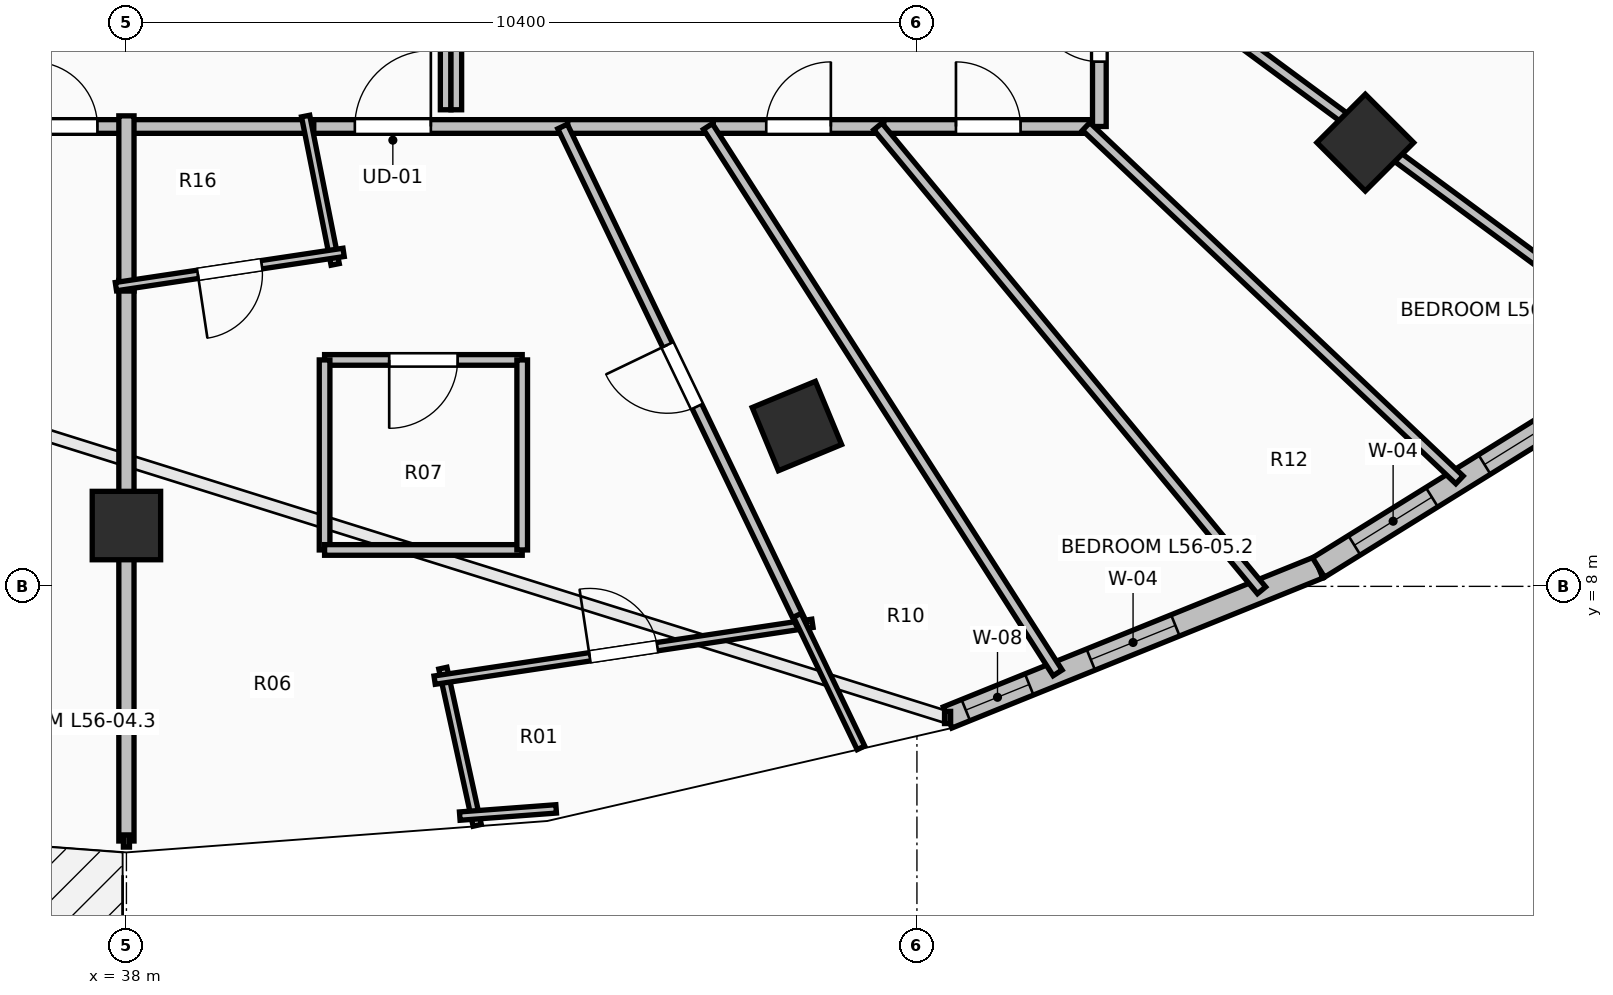
"""IFC4 building model, lengths in metres.
Left out: names, types, materials, properties, quantities, classifications, styles, units other than length and angle.
Written with IfcOpenShell. Run it as: python <this file> out.ifc"""

import sys

from ifc_helpers import new_model, si_unit, direction, frame, frame_2d, origin, origin_2d, place, context, subcontext, project, spatial, rectangle, extrude, element, fill, save


model = new_model("IFC4")
c1 = context("Model", 3, precision=1e-05, world=origin(), true_north=direction((0.0, 1.0)))
c2 = subcontext(c1, "Body", "Model", "MODEL_VIEW")
j1 = project(units=[si_unit("LENGTHUNIT", "METRE"), si_unit("PLANEANGLEUNIT", "RADIAN")], contexts=[c1])
p1 = place(None, origin())
s1 = spatial("IfcSite", under=j1, at=p1, CompositionType="ELEMENT")
p2 = place(p1, origin())
s2 = spatial("IfcBuilding", under=s1, at=p2, CompositionType="ELEMENT")
p3 = place(p2, frame((0.0, 0.0, 207.2)))
s3 = spatial("IfcBuildingStorey", under=s2, at=p3, CompositionType="ELEMENT", Elevation=207.2)
for number, where, z_axis, x_axis in (
    (1, (38.0, 8.8, 0.0), (0.0, 0.0, 1.0), (0.0, -1.0, 0.0)),
    (2, (46.821, 10.109, 0.0), (0.0, 0.0, 1.0), (0.383, -0.924, 0.0)),
    (3, (54.299, 13.838, 0.0), (0.0, 0.0, 1.0), (0.707, -0.707, 0.0)),
):
    element("IfcColumn", number, at=place(p3, frame(where, z_axis=z_axis, x_axis=x_axis)), inside=s3, PredefinedType="COLUMN", context=c2, shape_type="SweptSolid", body=[
        extrude(rectangle(XDim=0.9, YDim=0.9, at=origin_2d()), origin(), (0.0, 0.0, 1.0), 3.55),
    ])
p4 = place(p3, frame((48.803, 6.275, 0.0), z_axis=(0.0, 0.0, 1.0), x_axis=(0.927111094334, 0.374786630981, 0.0)))
e4 = element("IfcWall", 4, at=p4, inside=s3, PredefinedType="STANDARD", context=c2, shape_type="SweptSolid", body=[
    extrude(rectangle(XDim=5.264, YDim=0.3, at=frame_2d((2.632, 0.0))), origin(), (0.0, 0.0, 1.0), 3.29),
])
p5 = place(p4, frame((0.258, 0.0, 0.85)))
e5 = element("IfcOpeningElement", 5, at=p5, cuts=e4, PredefinedType="OPENING", context=c2, shape_type="SweptSolid", body=[
    extrude(rectangle(XDim=0.9, YDim=1.8, at=frame_2d((0.45, 0.9))), frame((0.0, 0.165, 0.0), z_axis=(0.0, -1.0, 0.0), x_axis=(1.0, 0.0, 0.0)), (0.0, 0.0, 1.0), 0.33),
])
p6 = place(p4, frame((2.032, 0.0, 0.85)))
e6 = element("IfcOpeningElement", 6, at=p6, cuts=e4, PredefinedType="OPENING", context=c2, shape_type="SweptSolid", body=[
    extrude(rectangle(XDim=1.2, YDim=1.95, at=frame_2d((0.6, 0.975))), frame((0.0, 0.165, 0.0), z_axis=(0.0, -1.0, 0.0), x_axis=(1.0, 0.0, 0.0)), (0.0, 0.0, 1.0), 0.33),
])
p7 = place(p3, frame((53.684, 8.248, 0.0), z_axis=(0.0, 0.0, 1.0), x_axis=(0.849647657754, 0.527350791858, 0.0)))
e7 = element("IfcWall", 7, at=p7, inside=s3, PredefinedType="STANDARD", context=c2, shape_type="SweptSolid", body=[
    extrude(rectangle(XDim=5.035, YDim=0.3, at=frame_2d((2.518, 0.0))), origin(), (0.0, 0.0, 1.0), 3.29),
])
p8 = place(p7, frame((0.555, 0.0, 0.85)))
e8 = element("IfcOpeningElement", 8, at=p8, cuts=e7, PredefinedType="OPENING", context=c2, shape_type="SweptSolid", body=[
    extrude(rectangle(XDim=1.2, YDim=1.95, at=frame_2d((0.6, 0.975))), frame((0.0, 0.165, 0.0), z_axis=(0.0, -1.0, 0.0), x_axis=(1.0, 0.0, 0.0)), (0.0, 0.0, 1.0), 0.33),
])
p9 = place(p7, frame((2.569, 0.0, 0.85)))
e9 = element("IfcOpeningElement", 9, at=p9, cuts=e7, PredefinedType="OPENING", context=c2, shape_type="SweptSolid", body=[
    extrude(rectangle(XDim=1.2, YDim=1.95, at=frame_2d((0.6, 0.975))), frame((0.0, 0.165, 0.0), z_axis=(0.0, -1.0, 0.0), x_axis=(1.0, 0.0, 0.0)), (0.0, 0.0, 1.0), 0.33),
])
p10 = place(p3, frame((36.327, 14.05, 0.0), z_axis=(0.0, 0.0, 1.0), x_axis=(1.0, 0.0, 0.0)))
e10 = element("IfcWall", 10, at=p10, inside=s3, PredefinedType="PARTITIONING", context=c2, shape_type="SweptSolid", body=[
    extrude(rectangle(XDim=1.733, YDim=0.18, at=frame_2d((0.867, 0.0))), origin(), (0.0, 0.0, 1.0), 2.936),
])
p11 = place(p10, frame((0.441, 0.0, 0.0)))
e11 = element("IfcOpeningElement", 11, at=p11, cuts=e10, PredefinedType="OPENING", context=c2, shape_type="SweptSolid", body=[
    extrude(rectangle(XDim=0.85, YDim=2.1, at=frame_2d((0.425, 1.05))), frame((0.0, 0.105, 0.0), z_axis=(0.0, -1.0, 0.0), x_axis=(1.0, 0.0, 0.0)), (0.0, 0.0, 1.0), 0.21),
])
p12 = place(p3, frame((40.325, 14.05, 0.0), z_axis=(0.0, 0.0, 1.0), x_axis=(1.0, 0.0, 0.0)))
e12 = element("IfcWall", 12, at=p12, inside=s3, PredefinedType="PARTITIONING", context=c2, shape_type="SweptSolid", body=[
    extrude(rectangle(XDim=3.48, YDim=0.18, at=frame_2d((1.74, 0.0))), origin(), (0.0, 0.0, 1.0), 2.936),
])
p13 = place(p12, frame((0.68, 0.0, 0.0)))
e13 = element("IfcOpeningElement", 13, at=p13, cuts=e12, PredefinedType="OPENING", context=c2, shape_type="SweptSolid", body=[
    extrude(rectangle(XDim=1.0, YDim=2.15, at=frame_2d((0.5, 1.075))), frame((0.0, 0.105, 0.0), z_axis=(0.0, -1.0, 0.0), x_axis=(1.0, 0.0, 0.0)), (0.0, 0.0, 1.0), 0.21),
])
p14 = place(p3, frame((37.92, 14.05, 0.0), z_axis=(0.0, 0.0, 1.0), x_axis=(1.0, 0.0, 0.0)))
e14 = element("IfcWall", 14, at=p14, inside=s3, PredefinedType="PARTITIONING", context=c2, shape_type="SweptSolid", body=[
    extrude(rectangle(XDim=2.545, YDim=0.18, at=frame_2d((1.272, 0.0))), origin(), (0.0, 0.0, 1.0), 2.936),
])
p15 = place(p3, frame((43.805, 14.05, 0.0), z_axis=(0.0, 0.0, 1.0), x_axis=(1.0, 0.0, 0.0)))
e15 = element("IfcWall", 15, at=p15, inside=s3, PredefinedType="PARTITIONING", context=c2, shape_type="SweptSolid", body=[
    extrude(rectangle(XDim=1.916, YDim=0.18, at=frame_2d((0.958, 0.0))), origin(), (0.0, 0.0, 1.0), 2.482),
])
p16 = place(p3, frame((45.721, 14.05, 0.0), z_axis=(0.0, 0.0, 1.0), x_axis=(1.0, 0.0, 0.0)))
e16 = element("IfcWall", 16, at=p16, inside=s3, PredefinedType="PARTITIONING", context=c2, shape_type="SweptSolid", body=[
    extrude(rectangle(XDim=2.243, YDim=0.18, at=frame_2d((1.122, 0.0))), origin(), (0.0, 0.0, 1.0), 2.482),
])
p17 = place(p16, frame((0.697, 0.0, 0.0)))
e17 = element("IfcOpeningElement", 17, at=p17, cuts=e16, PredefinedType="OPENING", context=c2, shape_type="SweptSolid", body=[
    extrude(rectangle(XDim=0.85, YDim=2.1, at=frame_2d((0.425, 1.05))), frame((0.0, 0.105, 0.0), z_axis=(0.0, -1.0, 0.0), x_axis=(1.0, 0.0, 0.0)), (0.0, 0.0, 1.0), 0.21),
])
p18 = place(p3, frame((47.964, 14.05, 0.0), z_axis=(0.0, 0.0, 1.0), x_axis=(1.0, 0.0, 0.0)))
e18 = element("IfcWall", 18, at=p18, inside=s3, PredefinedType="PARTITIONING", context=c2, shape_type="SweptSolid", body=[
    extrude(rectangle(XDim=2.749, YDim=0.18, at=frame_2d((1.375, 0.0))), origin(), (0.0, 0.0, 1.0), 2.482),
])
p19 = place(p18, frame((0.949, 0.0, 0.0)))
e19 = element("IfcOpeningElement", 19, at=p19, cuts=e18, PredefinedType="OPENING", context=c2, shape_type="SweptSolid", body=[
    extrude(rectangle(XDim=0.85, YDim=2.1, at=frame_2d((0.425, 1.05))), frame((0.0, 0.105, 0.0), z_axis=(0.0, -1.0, 0.0), x_axis=(1.0, 0.0, 0.0)), (0.0, 0.0, 1.0), 0.21),
])
p20 = place(p3, frame((50.8, 14.05, 0.0), z_axis=(0.0, 0.0, 1.0), x_axis=(0.0, 1.0, 0.0)))
e20 = element("IfcWall", 20, at=p20, inside=s3, PredefinedType="PARTITIONING", context=c2, shape_type="SweptSolid", body=[
    extrude(rectangle(XDim=2.556, YDim=0.18, at=frame_2d((1.278, 0.0))), origin(), (0.0, 0.0, 1.0), 2.482),
])
p21 = place(p20, frame((0.853, 0.0, 0.0)))
e21 = element("IfcOpeningElement", 21, at=p21, cuts=e20, PredefinedType="OPENING", context=c2, shape_type="SweptSolid", body=[
    extrude(rectangle(XDim=0.85, YDim=2.1, at=frame_2d((0.425, 1.05))), frame((0.0, 0.105, 0.0), z_axis=(0.0, -1.0, 0.0), x_axis=(1.0, 0.0, 0.0)), (0.0, 0.0, 1.0), 0.21),
])
p22 = place(p3, frame((38.0, 4.65, 0.0), z_axis=(0.0, 0.0, 1.0), x_axis=(0.0, 1.0, 0.0)))
e22 = element("IfcWall", 22, at=p22, inside=s3, PredefinedType="PARTITIONING", context=c2, shape_type="SweptSolid", body=[
    extrude(rectangle(XDim=7.375, YDim=0.2, at=frame_2d((3.688, 0.0))), origin(), (0.0, 0.0, 1.0), 3.022),
])
p23 = place(p3, frame((38.0, 11.885, 0.0), z_axis=(0.0, 0.0, 1.0), x_axis=(0.0, 1.0, 0.0)))
e23 = element("IfcWall", 23, at=p23, inside=s3, PredefinedType="PARTITIONING", context=c2, shape_type="SweptSolid", body=[
    extrude(rectangle(XDim=2.305, YDim=0.2, at=frame_2d((1.152, 0.0))), origin(), (0.0, 0.0, 1.0), 2.936),
])
p24 = place(p3, frame((40.358, 14.187, 0.0), z_axis=(0.0, 0.0, 1.0), x_axis=(0.195313900905, -0.980740781304, 0.0)))
e24 = element("IfcWall", 24, at=p24, inside=s3, PredefinedType="PARTITIONING", context=c2, shape_type="SweptSolid", body=[
    extrude(rectangle(XDim=1.99, YDim=0.11, at=frame_2d((0.995, 0.0))), origin(), (0.0, 0.0, 1.0), 2.936),
])
p25 = place(p3, frame((40.857, 12.394, 0.0), z_axis=(0.0, 0.0, 1.0), x_axis=(-0.988873015636, -0.148762088409, 0.0)))
e25 = element("IfcWall", 25, at=p25, inside=s3, PredefinedType="PARTITIONING", context=c2, shape_type="SweptSolid", body=[
    extrude(rectangle(XDim=3.03, YDim=0.11, at=frame_2d((1.515, 0.0))), origin(), (0.0, 0.0, 1.0), 3.29),
])
p26 = place(p25, frame((1.09, 0.0, 0.0)))
e26 = element("IfcOpeningElement", 26, at=p26, cuts=e25, PredefinedType="OPENING", context=c2, shape_type="SweptSolid", body=[
    extrude(rectangle(XDim=0.85, YDim=2.1, at=frame_2d((0.425, 1.05))), frame((0.0, 0.07, 0.0), z_axis=(0.0, -1.0, 0.0), x_axis=(1.0, 0.0, 0.0)), (0.0, 0.0, 1.0), 0.14),
])
p27 = place(p3, frame((42.615, 4.856, 0.0), z_axis=(0.0, 0.0, 1.0), x_axis=(-0.213521424511, 0.976938381514, 0.0)))
e27 = element("IfcWall", 27, at=p27, inside=s3, PredefinedType="PARTITIONING", context=c2, shape_type="SweptSolid", body=[
    extrude(rectangle(XDim=2.116, YDim=0.11, at=frame_2d((1.058, 0.0))), origin(), (0.0, 0.0, 1.0), 3.29),
])
p28 = place(p3, frame((42.055, 6.766, 0.0), z_axis=(0.0, 0.0, 1.0), x_axis=(0.988872134662, 0.148767944424, 0.0)))
e28 = element("IfcWall", 28, at=p28, inside=s3, PredefinedType="PARTITIONING", context=c2, shape_type="SweptSolid", body=[
    extrude(rectangle(XDim=5.027, YDim=0.11, at=frame_2d((2.513, 0.0))), origin(), (0.0, 0.0, 1.0), 3.29),
])
p29 = place(p28, frame((2.063, 0.0, 0.0)))
e29 = element("IfcOpeningElement", 29, at=p29, cuts=e28, PredefinedType="OPENING", context=c2, shape_type="SweptSolid", body=[
    extrude(rectangle(XDim=0.9, YDim=2.1, at=frame_2d((0.45, 1.05))), frame((0.0, 0.07, 0.0), z_axis=(0.0, -1.0, 0.0), x_axis=(1.0, 0.0, 0.0)), (0.0, 0.0, 1.0), 0.14),
])
p30 = place(p3, frame((42.385, 4.978, 0.0), z_axis=(0.0, 0.0, 1.0), x_axis=(0.997207179737, 0.074684942803, 0.0)))
e30 = element("IfcWall", 30, at=p30, inside=s3, PredefinedType="PARTITIONING", context=c2, shape_type="SweptSolid", body=[
    extrude(rectangle(XDim=1.272, YDim=0.11, at=frame_2d((0.636, 0.0))), origin(), (0.0, 0.0, 1.0), 3.29),
])
p31 = place(p3, frame((43.207, 10.979, 0.0), z_axis=(0.0, 0.0, 1.0), x_axis=(-1.0, 0.0, 0.0)))
e31 = element("IfcWall", 31, at=p31, inside=s3, PredefinedType="PARTITIONING", context=c2, shape_type="SweptSolid", body=[
    extrude(rectangle(XDim=2.6, YDim=0.14, at=frame_2d((1.3, 0.0))), origin(), (0.0, 0.0, 1.0), 2.482),
])
p32 = place(p31, frame((0.85, 0.0, 0.0)))
e32 = element("IfcOpeningElement", 32, at=p32, cuts=e31, PredefinedType="OPENING", context=c2, shape_type="SweptSolid", body=[
    extrude(rectangle(XDim=0.9, YDim=2.1, at=frame_2d((0.45, 1.05))), frame((0.0, 0.085, 0.0), z_axis=(0.0, -1.0, 0.0), x_axis=(1.0, 0.0, 0.0)), (0.0, 0.0, 1.0), 0.17),
])
p33 = place(p3, frame((40.607, 10.979, 0.0), z_axis=(0.0, 0.0, 1.0), x_axis=(0.0, -1.0, 0.0)))
e33 = element("IfcWall", 33, at=p33, inside=s3, PredefinedType="PARTITIONING", context=c2, shape_type="SweptSolid", body=[
    extrude(rectangle(XDim=2.5, YDim=0.14, at=frame_2d((1.25, 0.0))), origin(), (0.0, 0.0, 1.0), 2.482),
])
p34 = place(p3, frame((40.607, 8.479, 0.0), z_axis=(0.0, 0.0, 1.0), x_axis=(1.0, 0.0, 0.0)))
e34 = element("IfcWall", 34, at=p34, inside=s3, PredefinedType="PARTITIONING", context=c2, shape_type="SweptSolid", body=[
    extrude(rectangle(XDim=2.6, YDim=0.14, at=frame_2d((1.3, 0.0))), origin(), (0.0, 0.0, 1.0), 3.29),
])
p35 = place(p3, frame((43.207, 8.479, 0.0), z_axis=(0.0, 0.0, 1.0), x_axis=(0.0, 1.0, 0.0)))
e35 = element("IfcWall", 35, at=p35, inside=s3, PredefinedType="PARTITIONING", context=c2, shape_type="SweptSolid", body=[
    extrude(rectangle(XDim=2.5, YDim=0.14, at=frame_2d((1.25, 0.0))), origin(), (0.0, 0.0, 1.0), 2.824),
])
p36 = place(p3, frame((46.887, 7.493, 0.0), z_axis=(0.0, 0.0, 1.0), x_axis=(-0.43289909466, 0.901442385204, 0.0)))
e36 = element("IfcWall", 36, at=p36, inside=s3, PredefinedType="PARTITIONING", context=c2, shape_type="SweptSolid", body=[
    extrude(rectangle(XDim=7.274, YDim=0.14, at=frame_2d((3.637, 0.0))), origin(), (0.0, 0.0, 1.0), 2.482),
])
p37 = place(p36, frame((3.187, 0.0, 0.0)))
e37 = element("IfcOpeningElement", 37, at=p37, cuts=e36, PredefinedType="OPENING", context=c2, shape_type="SweptSolid", body=[
    extrude(rectangle(XDim=0.9, YDim=2.1, at=frame_2d((0.45, 1.05))), frame((0.0, 0.085, 0.0), z_axis=(0.0, -1.0, 0.0), x_axis=(1.0, 0.0, 0.0)), (0.0, 0.0, 1.0), 0.17),
])
p38 = place(p3, frame((47.664, 5.876, 0.0), z_axis=(0.0, 0.0, 1.0), x_axis=(-0.432866492457, 0.901458041014, 0.0)))
e38 = element("IfcWall", 38, at=p38, inside=s3, PredefinedType="PARTITIONING", context=c2, shape_type="SweptSolid", body=[
    extrude(rectangle(XDim=1.934, YDim=0.11, at=frame_2d((0.967, 0.0))), origin(), (0.0, 0.0, 1.0), 3.29),
])
p39 = place(p3, frame((50.251, 6.862, 0.0), z_axis=(0.0, 0.0, 1.0), x_axis=(-0.539117012224, 0.842230875194, 0.0)))
e39 = element("IfcWall", 39, at=p39, inside=s3, PredefinedType="PARTITIONING", context=c2, shape_type="SweptSolid", body=[
    extrude(rectangle(XDim=8.534, YDim=0.14, at=frame_2d((4.267, 0.0))), origin(), (0.0, 0.0, 1.0), 2.482),
])
p40 = place(p3, frame((52.934, 7.948, 0.0), z_axis=(0.0, 0.0, 1.0), x_axis=(-0.637427009283, 0.77051074479, 0.0)))
e40 = element("IfcWall", 40, at=p40, inside=s3, PredefinedType="PARTITIONING", context=c2, shape_type="SweptSolid", body=[
    extrude(rectangle(XDim=7.919, YDim=0.14, at=frame_2d((3.96, 0.0))), origin(), (0.0, 0.0, 1.0), 2.482),
])
p41 = place(p3, frame((55.538, 9.401, 0.0), z_axis=(0.0, 0.0, 1.0), x_axis=(-0.726277952769, 0.687401145854, 0.0)))
e41 = element("IfcWall", 41, at=p41, inside=s3, PredefinedType="PARTITIONING", context=c2, shape_type="SweptSolid", body=[
    extrude(rectangle(XDim=6.763, YDim=0.14, at=frame_2d((3.382, 0.0))), origin(), (0.0, 0.0, 1.0), 2.824),
])
p42 = place(p3, frame((58.174, 11.099, 0.0), z_axis=(0.0, 0.0, 1.0), x_axis=(-0.804363169868, 0.594137939338, 0.0)))
e42 = element("IfcWall", 42, at=p42, inside=s3, PredefinedType="PARTITIONING", context=c2, shape_type="SweptSolid", body=[
    extrude(rectangle(XDim=9.167, YDim=0.14, at=frame_2d((4.584, 0.0))), origin(), (0.0, 0.0, 1.0), 2.482),
])
p43 = place(p3, frame((60.524, 13.269, 0.0), z_axis=(0.0, 0.0, 1.0), x_axis=(-0.870572608778, 0.49203997078, 0.0)))
e43 = element("IfcWall", 43, at=p43, inside=s3, PredefinedType="PARTITIONING", context=c2, shape_type="SweptSolid", body=[
    extrude(rectangle(XDim=11.169, YDim=0.14, at=frame_2d((5.585, 0.0))), origin(), (0.0, 0.0, 1.0), 2.824),
])
for number, where, z_axis, x_axis in (
    (44, (42.2, 16.1, 0.0), (0.0, 0.0, 1.0), (0.0, -1.0, 0.0)),
    (45, (42.34, 14.27, 0.0), (0.0, 0.0, 1.0), (0.0, 1.0, 0.0)),
):
    element("IfcWall", number, at=place(p3, frame(where, z_axis=z_axis, x_axis=x_axis)), inside=s3, PredefinedType="PARTITIONING", context=c2, shape_type="SweptSolid", body=[
        extrude(rectangle(XDim=1.83, YDim=0.14, at=frame_2d((0.915, 0.0))), origin(), (0.0, 0.0, 1.0), 3.29),
    ])
p44 = place(p5, origin())
e46 = element("IfcWindow", 46, at=p44, inside=s3, PartitioningType="SINGLE_PANEL", PredefinedType="WINDOW", context=c2, shape_type="SweptSolid", body=[
    extrude(rectangle(XDim=0.9, YDim=1.8, at=frame_2d((0.45, 0.9))), frame((0.0, 0.03, 0.0), z_axis=(0.0, -1.0, 0.0), x_axis=(1.0, 0.0, 0.0)), (0.0, 0.0, 1.0), 0.06),
])
fill(e5, e46)
p45 = place(p6, origin())
e47 = element("IfcWindow", 47, at=p45, inside=s3, PartitioningType="SINGLE_PANEL", PredefinedType="WINDOW", context=c2, shape_type="SweptSolid", body=[
    extrude(rectangle(XDim=1.2, YDim=1.95, at=frame_2d((0.6, 0.975))), frame((0.0, 0.03, 0.0), z_axis=(0.0, -1.0, 0.0), x_axis=(1.0, 0.0, 0.0)), (0.0, 0.0, 1.0), 0.06),
])
fill(e6, e47)
p46 = place(p8, origin())
e48 = element("IfcWindow", 48, at=p46, inside=s3, PartitioningType="SINGLE_PANEL", PredefinedType="WINDOW", context=c2, shape_type="SweptSolid", body=[
    extrude(rectangle(XDim=1.2, YDim=1.95, at=frame_2d((0.6, 0.975))), frame((0.0, 0.03, 0.0), z_axis=(0.0, -1.0, 0.0), x_axis=(1.0, 0.0, 0.0)), (0.0, 0.0, 1.0), 0.06),
])
fill(e8, e48)
p47 = place(p9, origin())
e49 = element("IfcWindow", 49, at=p47, inside=s3, PartitioningType="SINGLE_PANEL", PredefinedType="WINDOW", context=c2, shape_type="SweptSolid", body=[
    extrude(rectangle(XDim=1.2, YDim=1.95, at=frame_2d((0.6, 0.975))), frame((0.0, 0.03, 0.0), z_axis=(0.0, -1.0, 0.0), x_axis=(1.0, 0.0, 0.0)), (0.0, 0.0, 1.0), 0.06),
])
fill(e9, e49)
p48 = place(p13, origin())
e50 = element("IfcDoor", 50, at=p48, inside=s3, OperationType="SINGLE_SWING_RIGHT", PredefinedType="DOOR", context=c2, shape_type="SweptSolid", body=[
    extrude(rectangle(XDim=1.0, YDim=2.15, at=frame_2d((0.5, 1.075))), frame((0.0, 0.025, 0.0), z_axis=(0.0, -1.0, 0.0), x_axis=(1.0, 0.0, 0.0)), (0.0, 0.0, 1.0), 0.05),
])
fill(e13, e50)
p49 = place(p26, origin())
e51 = element("IfcDoor", 51, at=p49, inside=s3, OperationType="SINGLE_SWING_RIGHT", PredefinedType="DOOR", context=c2, shape_type="SweptSolid", body=[
    extrude(rectangle(XDim=0.85, YDim=2.1, at=frame_2d((0.425, 1.05))), frame((0.0, 0.025, 0.0), z_axis=(0.0, -1.0, 0.0), x_axis=(1.0, 0.0, 0.0)), (0.0, 0.0, 1.0), 0.05),
])
fill(e26, e51)
p50 = place(p29, origin())
e52 = element("IfcDoor", 52, at=p50, inside=s3, OperationType="SINGLE_SWING_LEFT", PredefinedType="DOOR", context=c2, shape_type="SweptSolid", body=[
    extrude(rectangle(XDim=0.9, YDim=2.1, at=frame_2d((0.45, 1.05))), frame((0.0, 0.025, 0.0), z_axis=(0.0, -1.0, 0.0), x_axis=(1.0, 0.0, 0.0)), (0.0, 0.0, 1.0), 0.05),
])
fill(e29, e52)
p51 = place(p32, origin())
e53 = element("IfcDoor", 53, at=p51, inside=s3, OperationType="SINGLE_SWING_RIGHT", PredefinedType="DOOR", context=c2, shape_type="SweptSolid", body=[
    extrude(rectangle(XDim=0.9, YDim=2.1, at=frame_2d((0.45, 1.05))), frame((0.0, 0.025, 0.0), z_axis=(0.0, -1.0, 0.0), x_axis=(1.0, 0.0, 0.0)), (0.0, 0.0, 1.0), 0.05),
])
fill(e32, e53)
p52 = place(p37, origin())
e54 = element("IfcDoor", 54, at=p52, inside=s3, OperationType="SINGLE_SWING_RIGHT", PredefinedType="DOOR", context=c2, shape_type="SweptSolid", body=[
    extrude(rectangle(XDim=0.9, YDim=2.1, at=frame_2d((0.45, 1.05))), frame((0.0, 0.025, 0.0), z_axis=(0.0, -1.0, 0.0), x_axis=(1.0, 0.0, 0.0)), (0.0, 0.0, 1.0), 0.05),
])
fill(e37, e54)
p53 = place(p11, origin())
e55 = element("IfcDoor", 55, at=p53, inside=s3, OperationType="SINGLE_SWING_LEFT", PredefinedType="DOOR", context=c2, shape_type="SweptSolid", body=[
    extrude(rectangle(XDim=0.85, YDim=2.1, at=frame_2d((0.425, 1.05))), frame((0.0, 0.025, 0.0), z_axis=(0.0, -1.0, 0.0), x_axis=(1.0, 0.0, 0.0)), (0.0, 0.0, 1.0), 0.05),
])
fill(e11, e55)
p54 = place(p17, origin())
e56 = element("IfcDoor", 56, at=p54, inside=s3, OperationType="SINGLE_SWING_RIGHT", PredefinedType="DOOR", context=c2, shape_type="SweptSolid", body=[
    extrude(rectangle(XDim=0.85, YDim=2.1, at=frame_2d((0.425, 1.05))), frame((0.0, 0.025, 0.0), z_axis=(0.0, -1.0, 0.0), x_axis=(1.0, 0.0, 0.0)), (0.0, 0.0, 1.0), 0.05),
])
fill(e17, e56)
p55 = place(p19, origin())
e57 = element("IfcDoor", 57, at=p55, inside=s3, OperationType="SINGLE_SWING_LEFT", PredefinedType="DOOR", context=c2, shape_type="SweptSolid", body=[
    extrude(rectangle(XDim=0.85, YDim=2.1, at=frame_2d((0.425, 1.05))), frame((0.0, 0.025, 0.0), z_axis=(0.0, -1.0, 0.0), x_axis=(1.0, 0.0, 0.0)), (0.0, 0.0, 1.0), 0.05),
])
fill(e19, e57)
p56 = place(p21, origin())
e58 = element("IfcDoor", 58, at=p56, inside=s3, OperationType="SINGLE_SWING_RIGHT", PredefinedType="DOOR", context=c2, shape_type="SweptSolid", body=[
    extrude(rectangle(XDim=0.85, YDim=2.1, at=frame_2d((0.425, 1.05))), frame((0.0, 0.025, 0.0), z_axis=(0.0, -1.0, 0.0), x_axis=(1.0, 0.0, 0.0)), (0.0, 0.0, 1.0), 0.05),
])
fill(e21, e58)
save(model, sys.argv[1])
